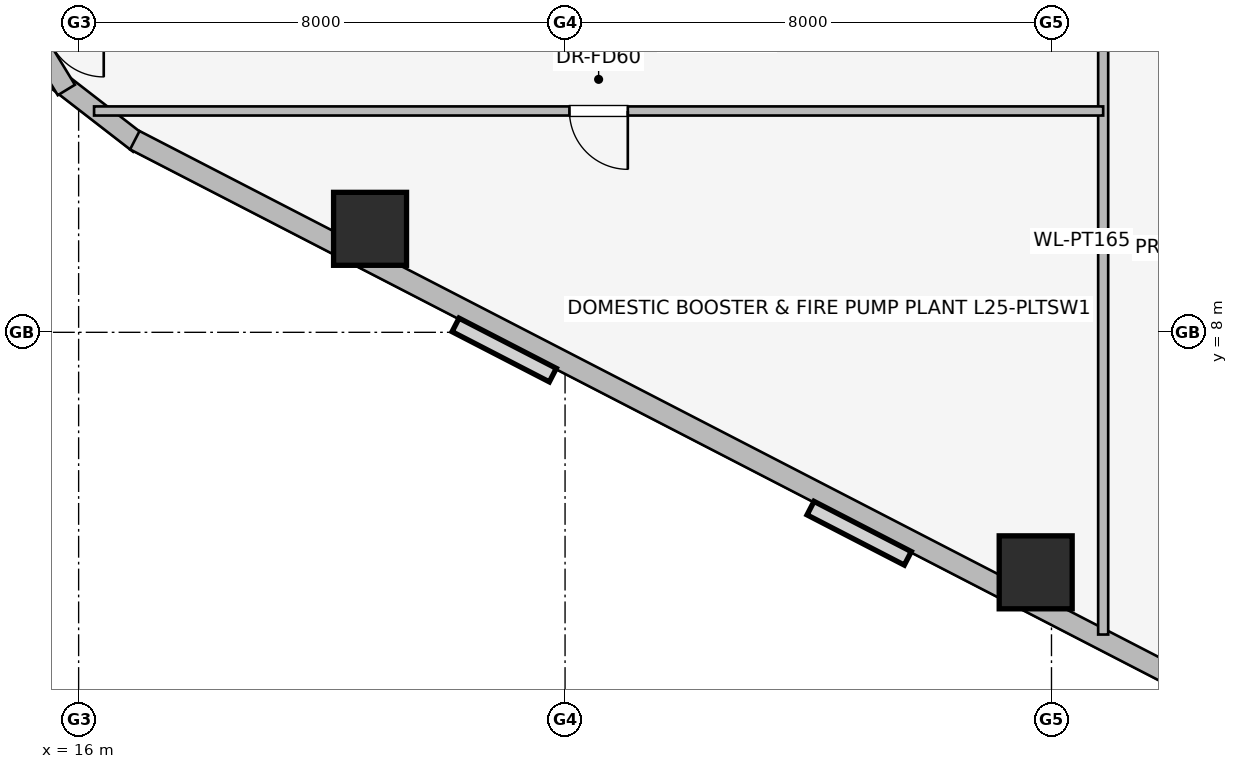
"""IFC4 building model, lengths in metres.
Left out: names, types, materials, properties, quantities, classifications, styles, units other than length and angle.
Written with IfcOpenShell. Run it as: python <this file> out.ifc"""

import sys

from ifc_helpers import new_model, si_unit, direction, frame, frame_2d, origin, origin_2d, place, context, subcontext, project, spatial, rectangle, extrude, element, fill, save


model = new_model("IFC4")
c1 = context("Model", 3, precision=1e-05, world=origin(), true_north=direction((0.0, 1.0)))
c2 = subcontext(c1, "Body", "Model", "MODEL_VIEW")
j1 = project(units=[si_unit("LENGTHUNIT", "METRE"), si_unit("PLANEANGLEUNIT", "RADIAN")], contexts=[c1])
p1 = place(None, origin())
s1 = spatial("IfcSite", under=j1, at=p1, CompositionType="ELEMENT")
p2 = place(p1, origin())
s2 = spatial("IfcBuilding", under=s1, at=p2, CompositionType="ELEMENT")
p3 = place(p2, frame((0.0, 0.0, 96.35)))
s3 = spatial("IfcBuildingStorey", under=s2, at=p3, CompositionType="ELEMENT", Elevation=96.35)
for number, where, z_axis, x_axis in (
    (1, (20.793, 9.702, 0.0), (0.0, 0.0, 1.0), (1.0, 0.0, 0.0)),
    (2, (31.74, 4.053, 0.0), (0.0, 0.0, 1.0), (1.0, 0.0, 0.0)),
):
    element("IfcColumn", number, at=place(p3, frame(where, z_axis=z_axis, x_axis=x_axis)), inside=s3, PredefinedType="COLUMN", context=c2, shape_type="SweptSolid", body=[
        extrude(rectangle(XDim=1.2, YDim=1.2, at=origin_2d()), origin(), (0.0, 0.0, 1.0), 5.2),
    ])
p4 = place(p3, frame((16.998, 11.099, 0.0), z_axis=(0.0, 0.0, 1.0), x_axis=(-0.790691856293, 0.61221433207, 0.0)))
e3 = element("IfcWall", 3, at=p4, inside=s3, PredefinedType="STANDARD", context=c2, shape_type="SweptSolid", body=[
    extrude(rectangle(XDim=1.676, YDim=0.33, at=frame_2d((0.838, 0.0))), origin(), (0.0, 0.0, 1.0), 4.78),
])
p5 = place(p3, frame((15.798, 11.985, 0.0), z_axis=(0.0, 0.0, 1.0), x_axis=(-0.520584129191, 0.853810379671, 0.0)))
e4 = element("IfcWall", 4, at=p5, inside=s3, PredefinedType="STANDARD", context=c2, shape_type="SweptSolid", body=[
    extrude(rectangle(XDim=1.677, YDim=0.33, at=frame_2d((0.838, 0.0))), origin(), (0.0, 0.0, 1.0), 4.78),
])
p6 = place(p3, frame((35.169, 1.743, 0.0), z_axis=(0.0, 0.0, 1.0), x_axis=(-0.888634413993, 0.458616264721, 0.0)))
e5 = element("IfcWall", 5, at=p6, inside=s3, PredefinedType="STANDARD", context=c2, shape_type="SweptSolid", body=[
    extrude(rectangle(XDim=20.531, YDim=0.34, at=frame_2d((10.266, 0.0))), origin(), (0.0, 0.0, 1.0), 3.688),
])
p7 = place(p3, frame((32.85, 3.03, 0.0), z_axis=(0.0, 0.0, 1.0), x_axis=(0.0, 1.0, 0.0)))
e6 = element("IfcWall", 6, at=p7, inside=s3, PredefinedType="PARTITIONING", context=c2, shape_type="SweptSolid", body=[
    extrude(rectangle(XDim=12.93, YDim=0.165, at=frame_2d((6.465, 0.0))), origin(), (0.0, 0.0, 1.0), 4.78),
])
p8 = place(p3, frame((32.85, 11.64, 0.0), z_axis=(0.0, 0.0, 1.0), x_axis=(-1.0, 0.0, 0.0)))
e7 = element("IfcWall", 7, at=p8, inside=s3, PredefinedType="PARTITIONING", context=c2, shape_type="SweptSolid", body=[
    extrude(rectangle(XDim=16.596, YDim=0.15, at=frame_2d((8.298, 0.0))), origin(), (0.0, 0.0, 1.0), 4.78),
])
p9 = place(p8, frame((7.818, 0.0, 0.0)))
e8 = element("IfcOpeningElement", 8, at=p9, cuts=e7, PredefinedType="OPENING", context=c2, shape_type="SweptSolid", body=[
    extrude(rectangle(XDim=0.96, YDim=2.0, at=frame_2d((0.48, 1.0))), frame((0.0, 0.085, 0.0), z_axis=(0.0, -1.0, 0.0), x_axis=(1.0, 0.0, 0.0)), (0.0, 0.0, 1.0), 0.17),
])
p10 = place(p9, origin())
e9 = element("IfcDoor", 9, at=p10, inside=s3, OperationType="SINGLE_SWING_LEFT", PredefinedType="DOOR", context=c2, shape_type="SweptSolid", body=[
    extrude(rectangle(XDim=0.96, YDim=2.0, at=frame_2d((0.48, 1.0))), frame((0.0, 0.025, 0.0), z_axis=(0.0, -1.0, 0.0), x_axis=(1.0, 0.0, 0.0)), (0.0, 0.0, 1.0), 0.05),
])
fill(e8, e9)
save(model, sys.argv[1])
